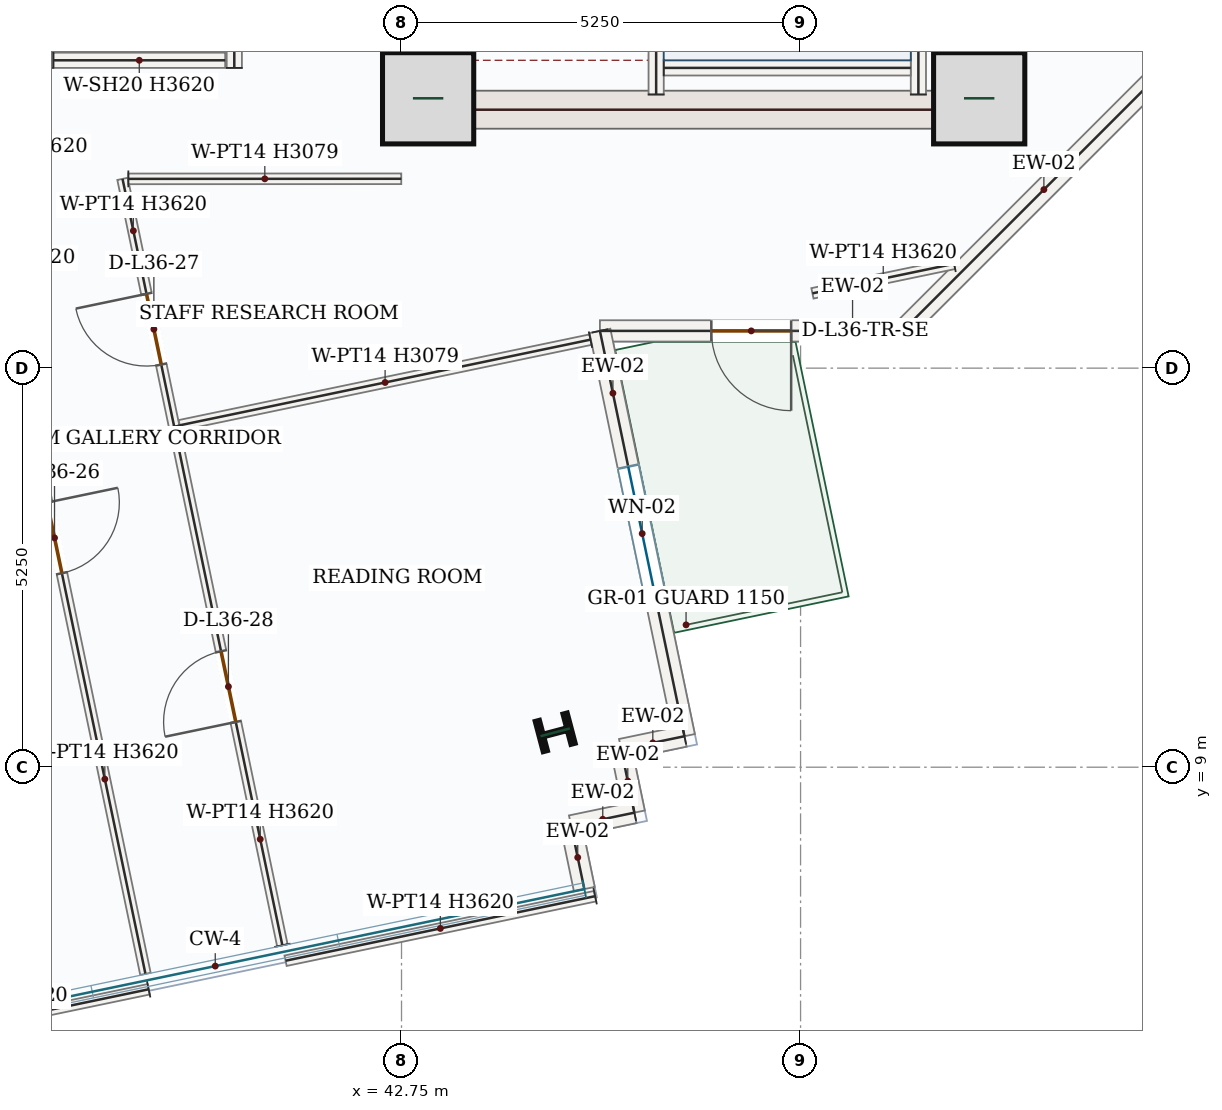
"""IFC4 building model, lengths in metres.
Left out: names, types, materials, properties, quantities, classifications, styles, units other than length and angle.
Written with IfcOpenShell. Run it as: python <this file> out.ifc"""

import sys

from ifc_helpers import new_model, si_unit, direction, frame, frame_2d, origin, origin_2d, place, context, subcontext, project, spatial, rectangle, i_section, extrude, source, transform, mapped, element, fill, save


model = new_model("IFC4")
c1 = context("Model", 3, precision=1e-05, world=origin(), true_north=direction((0.0, 1.0)))
c2 = subcontext(c1, "Body", "Model", "MODEL_VIEW")
j1 = project(units=[si_unit("LENGTHUNIT", "METRE"), si_unit("PLANEANGLEUNIT", "RADIAN")], contexts=[c1])
p1 = place(None, origin())
s1 = spatial("IfcSite", under=j1, at=p1, CompositionType="ELEMENT")
p2 = place(p1, origin())
s2 = spatial("IfcBuilding", under=s1, at=p2, CompositionType="ELEMENT")
p3 = place(p2, frame((0.0, 0.0, 159.0)))
s3 = spatial("IfcBuildingStorey", under=s2, at=p3, CompositionType="ELEMENT", Elevation=159.0)
p4 = place(p3, frame((43.0, 17.4, 0.0), z_axis=(0.0, 0.0, 1.0), x_axis=(0.0, 1.0, 0.0)))
e1 = element("IfcWall", 1, at=p4, inside=s3, PredefinedType="SHEAR", context=c2, shape_type="SweptSolid", body=[
    extrude(rectangle(XDim=8.55, YDim=0.5, at=frame_2d((4.275, 0.0))), origin(), (0.0, 0.0, 1.0), 3.62),
])
p5 = place(p4, frame((6.65, 0.0, 0.0)))
e2 = element("IfcOpeningElement", 2, at=p5, cuts=e1, PredefinedType="OPENING", context=c2, shape_type="SweptSolid", body=[
    extrude(rectangle(XDim=1.1, YDim=2.2, at=frame_2d((0.55, 1.1))), frame((0.0, 0.26, 0.0), z_axis=(0.0, -1.0, 0.0), x_axis=(1.0, 0.0, 0.0)), (0.0, 0.0, 1.0), 0.52),
])
p6 = place(p4, frame((1.75, 0.0, 0.0)))
e3 = element("IfcOpeningElement", 3, at=p6, cuts=e1, PredefinedType="OPENING", context=c2, shape_type="SweptSolid", body=[
    extrude(rectangle(XDim=1.3, YDim=2.2, at=frame_2d((0.65, 1.1))), frame((0.0, 0.26, 0.0), z_axis=(0.0, -1.0, 0.0), x_axis=(1.0, 0.0, 0.0)), (0.0, 0.0, 1.0), 0.52),
])
p7 = place(p4, frame((4.55, 0.0, 0.0)))
e4 = element("IfcOpeningElement", 4, at=p7, cuts=e1, PredefinedType="OPENING", context=c2, shape_type="SweptSolid", body=[
    extrude(rectangle(XDim=0.88, YDim=2.1, at=frame_2d((0.44, 1.05))), frame((0.0, 0.26, 0.0), z_axis=(0.0, -1.0, 0.0), x_axis=(1.0, 0.0, 0.0)), (0.0, 0.0, 1.0), 0.52),
])
m1 = source(origin(), c2, "Body", "SweptSolid", [
    extrude(rectangle(XDim=8.55, YDim=0.5, at=frame_2d((4.275, 0.0))), origin(), (0.0, 0.0, 1.0), 3.62),
])
p8 = place(p3, frame((50.5, 17.4, 0.0), z_axis=(0.0, 0.0, 1.0), x_axis=(0.0, 1.0, 0.0)))
e5 = element("IfcWall", 5, at=p8, inside=s3, PredefinedType="SHEAR", context=c2, shape_type="MappedRepresentation", body=[
    mapped(m1, transform((0.0, 0.0, 0.0), x_axis=(1.0, 0.0, 0.0), y_axis=(0.0, 1.0, 0.0), z_axis=(0.0, 0.0, 1.0), scale=1.0)),
])
m2 = source(origin(), c2, "Body", "SweptSolid", [
    extrude(rectangle(XDim=7.0, YDim=0.5, at=frame_2d((3.5, 0.0))), origin(), (0.0, 0.0, 1.0), 3.62),
])
p9 = place(p3, frame((43.25, 17.65, 0.0), z_axis=(0.0, 0.0, 1.0), x_axis=(1.0, 0.0, 0.0)))
e6 = element("IfcWall", 6, at=p9, inside=s3, PredefinedType="SHEAR", context=c2, shape_type="MappedRepresentation", body=[
    mapped(m2, transform((0.0, 0.0, 0.0), x_axis=(1.0, 0.0, 0.0), y_axis=(0.0, 1.0, 0.0), z_axis=(0.0, 0.0, 1.0), scale=1.0)),
])
m3 = source(origin(), c2, "Body", "SweptSolid", [
    extrude(rectangle(XDim=1.2, YDim=1.2, at=origin_2d()), origin(), (0.0, 0.0, 1.0), 3.9),
])
for number, where, z_axis, x_axis in (
    (7, (43.1, 17.8, 0.0), (0.0, 0.0, 1.0), (1.0, 0.0, 0.0)),
    (8, (50.35, 17.8, 0.0), (0.0, 0.0, 1.0), (1.0, 0.0, 0.0)),
):
    element("IfcColumn", number, at=place(p3, frame(where, z_axis=z_axis, x_axis=x_axis)), inside=s3, PredefinedType="COLUMN", context=c2, shape_type="MappedRepresentation", body=[
        mapped(m3, transform((0.0, 0.0, 0.0), x_axis=(1.0, 0.0, 0.0), y_axis=(0.0, 1.0, 0.0), z_axis=(0.0, 0.0, 1.0), scale=1.0)),
    ])
m4 = source(origin(), c2, "Body", "SweptSolid", [
    extrude(i_section(OverallWidth=0.412, OverallDepth=0.435, WebThickness=0.036, FlangeThickness=0.057, FilletRadius=0.018, at=origin_2d()), origin(), (0.0, 0.0, 1.0), 3.9),
])
p10 = place(p3, frame((44.772, 9.459, 0.0), z_axis=(0.0, 0.0, 1.0), x_axis=(-0.255445757936, 0.966823388604, 0.0)))
e9 = element("IfcColumn", 9, at=p10, inside=s3, PredefinedType="COLUMN", context=c2, shape_type="MappedRepresentation", body=[
    mapped(m4, transform((0.0, 0.0, 0.0), x_axis=(1.0, 0.0, 0.0), y_axis=(0.0, 1.0, 0.0), z_axis=(0.0, 0.0, 1.0), scale=1.0)),
])
m5 = source(origin(), c2, "Body", "SweptSolid", [
    extrude(rectangle(XDim=5.258, YDim=0.28, at=frame_2d((2.629, 0.0))), origin(), (0.0, 0.0, 1.0), 3.62),
])
p11 = place(p3, frame((53.06, 18.458, 0.0), z_axis=(0.0, 0.0, 1.0), x_axis=(-0.707106781187, -0.707106781187, 0.0)))
e10 = element("IfcWall", 10, at=p11, inside=s3, PredefinedType="SOLIDWALL", context=c2, shape_type="MappedRepresentation", body=[
    mapped(m5, transform((0.0, 0.0, 0.0), x_axis=(1.0, 0.0, 0.0), y_axis=(0.0, 1.0, 0.0), z_axis=(0.0, 0.0, 1.0), scale=1.0)),
])
p12 = place(p3, frame((49.342, 14.74, 0.0), z_axis=(0.0, 0.0, 1.0), x_axis=(-1.0, 0.0, 0.0)))
e11 = element("IfcWall", 11, at=p12, inside=s3, PredefinedType="SOLIDWALL", context=c2, shape_type="SweptSolid", body=[
    extrude(rectangle(XDim=3.982, YDim=0.28, at=frame_2d((1.991, 0.0))), origin(), (0.0, 0.0, 1.0), 3.62),
])
p13 = place(p12, frame((1.466, 0.0, 0.0)))
e12 = element("IfcOpeningElement", 12, at=p13, cuts=e11, PredefinedType="OPENING", context=c2, shape_type="SweptSolid", body=[
    extrude(rectangle(XDim=1.05, YDim=2.15, at=frame_2d((0.525, 1.075))), frame((0.0, 0.15, 0.0), z_axis=(0.0, -1.0, 0.0), x_axis=(1.0, 0.0, 0.0)), (0.0, 0.0, 1.0), 0.3),
])
p14 = place(p3, frame((45.36, 14.74, 0.0), z_axis=(0.0, 0.0, 1.0), x_axis=(0.204151126022, -0.978939384101, 0.0)))
e13 = element("IfcWall", 13, at=p14, inside=s3, PredefinedType="SOLIDWALL", context=c2, shape_type="SweptSolid", body=[
    extrude(rectangle(XDim=5.447, YDim=0.28, at=frame_2d((2.724, 0.0))), origin(), (0.0, 0.0, 1.0), 3.62),
])
p15 = place(p14, frame((1.824, 0.0, 0.85)))
e14 = element("IfcOpeningElement", 14, at=p15, cuts=e13, PredefinedType="OPENING", context=c2, shape_type="SweptSolid", body=[
    extrude(rectangle(XDim=1.8, YDim=1.75, at=frame_2d((0.9, 0.875))), frame((0.0, 0.15, 0.0), z_axis=(0.0, -1.0, 0.0), x_axis=(1.0, 0.0, 0.0)), (0.0, 0.0, 1.0), 0.3),
])
m6 = source(origin(), c2, "Body", "SweptSolid", [
    extrude(rectangle(XDim=0.85, YDim=0.28, at=frame_2d((0.425, 0.0))), origin(), (0.0, 0.0, 1.0), 3.62),
])
for number, where, z_axis, x_axis in (
    (15, (46.472, 9.407, 0.0), (0.0, 0.0, 1.0), (-0.979, -0.204, 0.0)),
    (16, (45.64, 9.234, 0.0), (0.0, 0.0, 1.0), (0.204, -0.979, 0.0)),
):
    element("IfcWall", number, at=place(p3, frame(where, z_axis=z_axis, x_axis=x_axis)), inside=s3, PredefinedType="SOLIDWALL", context=c2, shape_type="MappedRepresentation", body=[
        mapped(m6, transform((0.0, 0.0, 0.0), x_axis=(1.0, 0.0, 0.0), y_axis=(0.0, 1.0, 0.0), z_axis=(0.0, 0.0, 1.0), scale=1.0)),
    ])
m7 = source(origin(), c2, "Body", "SweptSolid", [
    extrude(rectangle(XDim=0.85, YDim=0.28, at=frame_2d((0.425, 0.0))), origin(), (0.0, 0.0, 1.0), 3.62),
])
p16 = place(p3, frame((45.814, 8.402, 0.0), z_axis=(0.0, 0.0, 1.0), x_axis=(-0.97893500384, -0.204172128991, 0.0)))
e17 = element("IfcWall", 17, at=p16, inside=s3, PredefinedType="SOLIDWALL", context=c2, shape_type="MappedRepresentation", body=[
    mapped(m7, transform((0.0, 0.0, 0.0), x_axis=(1.0, 0.0, 0.0), y_axis=(0.0, 1.0, 0.0), z_axis=(0.0, 0.0, 1.0), scale=1.0)),
])
p17 = place(p3, frame((44.981, 8.228, 0.0), z_axis=(0.0, 0.0, 1.0), x_axis=(0.20422954019, -0.978923028084, 0.0)))
e18 = element("IfcWall", 18, at=p17, inside=s3, PredefinedType="SOLIDWALL", context=c2, shape_type="MappedRepresentation", body=[
    mapped(m6, transform((0.0, 0.0, 0.0), x_axis=(1.0, 0.0, 0.0), y_axis=(0.0, 1.0, 0.0), z_axis=(0.0, 0.0, 1.0), scale=1.0)),
])
m8 = source(origin(), c2, "Body", "SweptSolid", [
    extrude(rectangle(XDim=7.87, YDim=0.2, at=frame_2d((3.935, 0.0))), origin(), (0.0, 0.0, 1.0), 3.62),
])
p18 = place(p3, frame((49.55, 17.85, 0.0), z_axis=(0.0, 0.0, 1.0), x_axis=(0.0, 1.0, 0.0)))
e19 = element("IfcWall", 19, at=p18, inside=s3, PredefinedType="SOLIDWALL", context=c2, shape_type="MappedRepresentation", body=[
    mapped(m8, transform((0.0, 0.0, 0.0), x_axis=(1.0, 0.0, 0.0), y_axis=(0.0, 1.0, 0.0), z_axis=(0.0, 0.0, 1.0), scale=1.0)),
])
p19 = place(p3, frame((46.1, 17.85, 0.0), z_axis=(0.0, 0.0, 1.0), x_axis=(0.0, 1.0, 0.0)))
e20 = element("IfcWall", 20, at=p19, inside=s3, PredefinedType="SOLIDWALL", context=c2, shape_type="SweptSolid", body=[
    extrude(rectangle(XDim=8.0, YDim=0.2, at=frame_2d((4.0, 0.0))), origin(), (0.0, 0.0, 1.0), 3.62),
])
p20 = place(p19, frame((6.3, 0.0, 0.0)))
e21 = element("IfcOpeningElement", 21, at=p20, cuts=e20, PredefinedType="OPENING", context=c2, shape_type="SweptSolid", body=[
    extrude(rectangle(XDim=1.05, YDim=2.15, at=frame_2d((0.525, 1.075))), frame((0.0, 0.11, 0.0), z_axis=(0.0, -1.0, 0.0), x_axis=(1.0, 0.0, 0.0)), (0.0, 0.0, 1.0), 0.22),
])
m9 = source(origin(), c2, "Body", "SweptSolid", [
    extrude(rectangle(XDim=3.25, YDim=0.2, at=frame_2d((1.625, 0.0))), origin(), (0.0, 0.0, 1.0), 3.62),
])
p21 = place(p3, frame((46.2, 18.2, 0.0), z_axis=(0.0, 0.0, 1.0), x_axis=(1.0, 0.0, 0.0)))
e22 = element("IfcWall", 22, at=p21, inside=s3, PredefinedType="SOLIDWALL", context=c2, shape_type="MappedRepresentation", body=[
    mapped(m9, transform((0.0, 0.0, 0.0), x_axis=(1.0, 0.0, 0.0), y_axis=(0.0, 1.0, 0.0), z_axis=(0.0, 0.0, 1.0), scale=1.0)),
])
p22 = place(p3, frame((40.55, 18.2, 0.0), z_axis=(0.0, 0.0, 1.0), x_axis=(0.0, 1.0, 0.0)))
e23 = element("IfcWall", 23, at=p22, inside=s3, PredefinedType="SOLIDWALL", context=c2, shape_type="SweptSolid", body=[
    extrude(rectangle(XDim=2.35, YDim=0.2, at=frame_2d((1.175, 0.0))), origin(), (0.0, 0.0, 1.0), 3.62),
])
p23 = place(p22, frame((0.625, 0.0, 0.0)))
e24 = element("IfcOpeningElement", 24, at=p23, cuts=e23, PredefinedType="OPENING", context=c2, shape_type="SweptSolid", body=[
    extrude(rectangle(XDim=1.1, YDim=2.15, at=frame_2d((0.55, 1.075))), frame((0.0, 0.11, 0.0), z_axis=(0.0, -1.0, 0.0), x_axis=(1.0, 0.0, 0.0)), (0.0, 0.0, 1.0), 0.22),
])
m10 = source(origin(), c2, "Body", "SweptSolid", [
    extrude(rectangle(XDim=2.26, YDim=0.2, at=frame_2d((1.13, 0.0))), origin(), (0.0, 0.0, 1.0), 3.62),
])
p24 = place(p3, frame((38.17, 18.3, 0.0), z_axis=(0.0, 0.0, 1.0), x_axis=(1.0, 0.0, 0.0)))
e25 = element("IfcWall", 25, at=p24, inside=s3, PredefinedType="SOLIDWALL", context=c2, shape_type="MappedRepresentation", body=[
    mapped(m10, transform((0.0, 0.0, 0.0), x_axis=(1.0, 0.0, 0.0), y_axis=(0.0, 1.0, 0.0), z_axis=(0.0, 0.0, 1.0), scale=1.0)),
])
p25 = place(p3, frame((39.759, 13.483, 0.0), z_axis=(0.0, 0.0, 1.0), x_axis=(-0.204124193585, 0.97894500029, 0.0)))
e26 = element("IfcWall", 26, at=p25, inside=s3, PredefinedType="PARTITIONING", context=c2, shape_type="SweptSolid", body=[
    extrude(rectangle(XDim=3.327, YDim=0.14, at=frame_2d((1.664, 0.0))), origin(), (0.0, 0.0, 1.0), 3.62),
])
p26 = place(p25, frame((0.832, 0.0, 0.0)))
e27 = element("IfcOpeningElement", 27, at=p26, cuts=e26, PredefinedType="OPENING", context=c2, shape_type="SweptSolid", body=[
    extrude(rectangle(XDim=0.95, YDim=2.15, at=frame_2d((0.475, 1.075))), frame((0.0, 0.08, 0.0), z_axis=(0.0, -1.0, 0.0), x_axis=(1.0, 0.0, 0.0)), (0.0, 0.0, 1.0), 0.16),
])
m11 = source(origin(), c2, "Body", "SweptSolid", [
    extrude(rectangle(XDim=3.591, YDim=0.14, at=frame_2d((1.795, 0.0))), origin(), (0.0, 0.0, 1.0), 3.079),
])
p27 = place(p3, frame((39.156, 16.74, 0.0), z_axis=(0.0, 0.0, 1.0), x_axis=(0.999999942209, 0.000339974142, 0.0)))
e28 = element("IfcWall", 28, at=p27, inside=s3, PredefinedType="PARTITIONING", context=c2, shape_type="MappedRepresentation", body=[
    mapped(m11, transform((0.0, 0.0, 0.0), x_axis=(1.0, 0.0, 0.0), y_axis=(0.0, 1.0, 0.0), z_axis=(0.0, 0.0, 1.0), scale=1.0)),
])
m12 = source(origin(), c2, "Body", "SweptSolid", [
    extrude(rectangle(XDim=1.903, YDim=0.14, at=frame_2d((0.952, 0.0))), origin(), (0.0, 0.0, 1.0), 3.62),
])
p28 = place(p3, frame((50.019, 15.623, 0.0), z_axis=(0.0, 0.0, 1.0), x_axis=(-0.978929167673, -0.204200109399, 0.0)))
e29 = element("IfcWall", 29, at=p28, inside=s3, PredefinedType="PARTITIONING", context=c2, shape_type="MappedRepresentation", body=[
    mapped(m12, transform((0.0, 0.0, 0.0), x_axis=(1.0, 0.0, 0.0), y_axis=(0.0, 1.0, 0.0), z_axis=(0.0, 0.0, 1.0), scale=1.0)),
])
m13 = source(origin(), c2, "Body", "SweptSolid", [
    extrude(rectangle(XDim=5.52, YDim=0.14, at=frame_2d((2.76, 0.0))), origin(), (0.0, 0.0, 1.0), 3.079),
])
p29 = place(p3, frame((45.236, 14.625, 0.0), z_axis=(0.0, 0.0, 1.0), x_axis=(-0.97893845252, -0.204155593062, 0.0)))
e30 = element("IfcWall", 30, at=p29, inside=s3, PredefinedType="PARTITIONING", context=c2, shape_type="MappedRepresentation", body=[
    mapped(m13, transform((0.0, 0.0, 0.0), x_axis=(1.0, 0.0, 0.0), y_axis=(0.0, 1.0, 0.0), z_axis=(0.0, 0.0, 1.0), scale=1.0)),
])
m14 = source(origin(), c2, "Body", "SweptSolid", [
    extrude(rectangle(XDim=4.16, YDim=0.14, at=frame_2d((2.08, 0.0))), origin(), (0.0, 0.0, 1.0), 3.62),
])
p30 = place(p3, frame((45.297, 7.303, 0.0), z_axis=(0.0, 0.0, 1.0), x_axis=(-0.978935967244, -0.204167509744, 0.0)))
e31 = element("IfcWall", 31, at=p30, inside=s3, PredefinedType="PARTITIONING", context=c2, shape_type="MappedRepresentation", body=[
    mapped(m14, transform((0.0, 0.0, 0.0), x_axis=(1.0, 0.0, 0.0), y_axis=(0.0, 1.0, 0.0), z_axis=(0.0, 0.0, 1.0), scale=1.0)),
])
p31 = place(p3, frame((41.182, 6.657, 0.0), z_axis=(0.0, 0.0, 1.0), x_axis=(-0.204158980406, 0.97893774609, 0.0)))
e32 = element("IfcWall", 32, at=p31, inside=s3, PredefinedType="PARTITIONING", context=c2, shape_type="SweptSolid", body=[
    extrude(rectangle(XDim=6.953, YDim=0.14, at=frame_2d((3.476, 0.0))), origin(), (0.0, 0.0, 1.0), 3.62),
])
p32 = place(p31, frame((3.001, 0.0, 0.0)))
e33 = element("IfcOpeningElement", 33, at=p32, cuts=e32, PredefinedType="OPENING", context=c2, shape_type="SweptSolid", body=[
    extrude(rectangle(XDim=0.95, YDim=2.15, at=frame_2d((0.475, 1.075))), frame((0.0, 0.08, 0.0), z_axis=(0.0, -1.0, 0.0), x_axis=(1.0, 0.0, 0.0)), (0.0, 0.0, 1.0), 0.16),
])
p33 = place(p3, frame((37.778, 13.969, 0.0), z_axis=(0.0, 0.0, 1.0), x_axis=(0.204175249208, -0.978934353065, 0.0)))
e34 = element("IfcWall", 34, at=p33, inside=s3, PredefinedType="PARTITIONING", context=c2, shape_type="SweptSolid", body=[
    extrude(rectangle(XDim=7.853, YDim=0.14, at=frame_2d((3.926, 0.0))), origin(), (0.0, 0.0, 1.0), 3.62),
])
p34 = place(p33, frame((1.519, 0.0, 0.0)))
e35 = element("IfcOpeningElement", 35, at=p34, cuts=e34, PredefinedType="OPENING", context=c2, shape_type="SweptSolid", body=[
    extrude(rectangle(XDim=0.95, YDim=2.15, at=frame_2d((0.475, 1.075))), frame((0.0, 0.08, 0.0), z_axis=(0.0, -1.0, 0.0), x_axis=(1.0, 0.0, 0.0)), (0.0, 0.0, 1.0), 0.16),
])
m15 = source(origin(), c2, "Body", "SweptSolid", [
    extrude(rectangle(XDim=4.16, YDim=0.14, at=frame_2d((2.08, 0.0))), origin(), (0.0, 0.0, 1.0), 3.62),
])
p35 = place(p3, frame((39.423, 6.078, 0.0), z_axis=(0.0, 0.0, 1.0), x_axis=(-0.978945249929, -0.204122996358, 0.0)))
e36 = element("IfcWall", 36, at=p35, inside=s3, PredefinedType="PARTITIONING", context=c2, shape_type="MappedRepresentation", body=[
    mapped(m15, transform((0.0, 0.0, 0.0), x_axis=(1.0, 0.0, 0.0), y_axis=(0.0, 1.0, 0.0), z_axis=(0.0, 0.0, 1.0), scale=1.0)),
])
m16 = source(origin(), c2, "Body", "SweptSolid", [
    extrude(rectangle(XDim=1.05, YDim=2.15, at=frame_2d((0.525, 1.075))), frame((0.0, 0.025, 0.0), z_axis=(0.0, -1.0, 0.0), x_axis=(1.0, 0.0, 0.0)), (0.0, 0.0, 1.0), 0.05),
])
p36 = place(p13, origin())
e37 = element("IfcDoor", 37, at=p36, inside=s3, OperationType="SINGLE_SWING_LEFT", PredefinedType="DOOR", context=c2, shape_type="MappedRepresentation", body=[
    mapped(m16, transform((0.0, 0.0, 0.0), x_axis=(1.0, 0.0, 0.0), y_axis=(0.0, 1.0, 0.0), z_axis=(0.0, 0.0, 1.0), scale=1.0)),
])
fill(e12, e37)
m17 = source(origin(), c2, "Body", "SweptSolid", [
    extrude(rectangle(XDim=1.8, YDim=1.75, at=frame_2d((0.9, 0.875))), frame((0.0, 0.03, 0.0), z_axis=(0.0, -1.0, 0.0), x_axis=(1.0, 0.0, 0.0)), (0.0, 0.0, 1.0), 0.06),
])
p37 = place(p15, origin())
e38 = element("IfcWindow", 38, at=p37, inside=s3, PartitioningType="DOUBLE_PANEL_VERTICAL", PredefinedType="WINDOW", context=c2, shape_type="MappedRepresentation", body=[
    mapped(m17, transform((0.0, 0.0, 0.0), x_axis=(1.0, 0.0, 0.0), y_axis=(0.0, 1.0, 0.0), z_axis=(0.0, 0.0, 1.0), scale=1.0)),
])
fill(e14, e38)
m18 = source(origin(), c2, "Body", "SweptSolid", [
    extrude(rectangle(XDim=0.95, YDim=2.15, at=frame_2d((0.475, 1.075))), frame((0.0, 0.025, 0.0), z_axis=(0.0, -1.0, 0.0), x_axis=(1.0, 0.0, 0.0)), (0.0, 0.0, 1.0), 0.05),
])
p38 = place(p34, origin())
e39 = element("IfcDoor", 39, at=p38, inside=s3, OperationType="SINGLE_SWING_LEFT", PredefinedType="DOOR", context=c2, shape_type="MappedRepresentation", body=[
    mapped(m18, transform((0.0, 0.0, 0.0), x_axis=(1.0, 0.0, 0.0), y_axis=(0.0, 1.0, 0.0), z_axis=(0.0, 0.0, 1.0), scale=1.0)),
])
fill(e35, e39)
p39 = place(p26, origin())
e40 = element("IfcDoor", 40, at=p39, inside=s3, OperationType="SINGLE_SWING_RIGHT", PredefinedType="DOOR", context=c2, shape_type="MappedRepresentation", body=[
    mapped(m18, transform((0.0, 0.0, 0.0), x_axis=(1.0, 0.0, 0.0), y_axis=(0.0, 1.0, 0.0), z_axis=(0.0, 0.0, 1.0), scale=1.0)),
])
fill(e27, e40)
p40 = place(p32, origin())
e41 = element("IfcDoor", 41, at=p40, inside=s3, OperationType="SINGLE_SWING_LEFT", PredefinedType="DOOR", context=c2, shape_type="MappedRepresentation", body=[
    mapped(m18, transform((0.0, 0.0, 0.0), x_axis=(1.0, 0.0, 0.0), y_axis=(0.0, 1.0, 0.0), z_axis=(0.0, 0.0, 1.0), scale=1.0)),
])
fill(e33, e41)
save(model, sys.argv[1])
